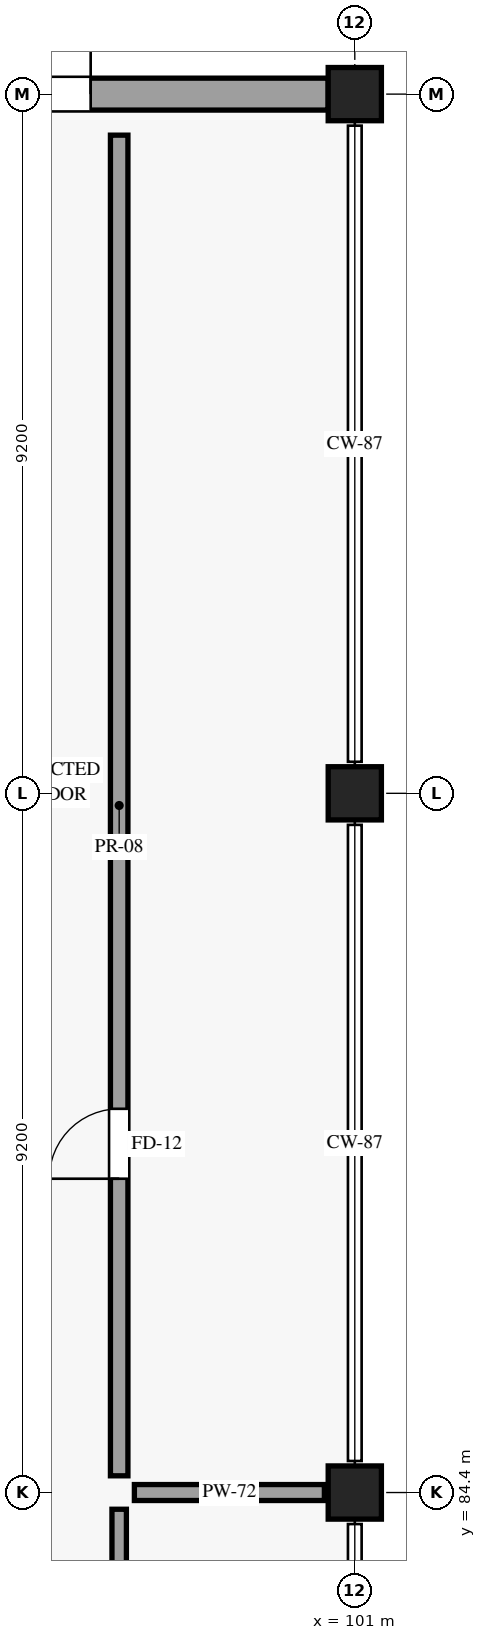
"""IFC4 building model, lengths in metres.
Left out: names, types, materials, properties, quantities, classifications, styles, units other than length and angle.
Written with IfcOpenShell. Run it as: python <this file> out.ifc"""

import sys

from ifc_helpers import new_model, si_unit, direction, frame, frame_2d, origin, origin_2d, place, context, subcontext, project, spatial, rectangle, extrude, element, fill, save


model = new_model("IFC4")
c1 = context("Model", 3, precision=1e-05, world=origin(), true_north=direction((0.0, 1.0)))
c2 = subcontext(c1, "Body", "Model", "MODEL_VIEW")
j1 = project(units=[si_unit("LENGTHUNIT", "METRE"), si_unit("PLANEANGLEUNIT", "RADIAN")], contexts=[c1])
p1 = place(None, origin())
s1 = spatial("IfcSite", under=j1, at=p1, CompositionType="ELEMENT")
p2 = place(p1, origin())
s2 = spatial("IfcBuilding", under=s1, at=p2, CompositionType="ELEMENT")
p3 = place(p2, origin())
s3 = spatial("IfcBuildingStorey", under=s2, at=p3, CompositionType="ELEMENT", Elevation=0.0)
for number, where, z_axis, x_axis in (
    (1, (101.0, 84.4, 0.0), (0.0, 0.0, 1.0), (1.0, 0.0, 0.0)),
    (2, (101.0, 93.6, 0.0), (0.0, 0.0, 1.0), (1.0, 0.0, 0.0)),
    (3, (101.0, 102.8, 0.0), (0.0, 0.0, 1.0), (1.0, 0.0, 0.0)),
):
    element("IfcColumn", number, at=place(p3, frame(where, z_axis=z_axis, x_axis=x_axis)), inside=s3, PredefinedType="COLUMN", context=c2, shape_type="SweptSolid", body=[
        extrude(rectangle(XDim=0.7, YDim=0.7, at=origin_2d()), origin(), (0.0, 0.0, 1.0), 5.4),
    ])
p4 = place(p3, frame((92.35, 102.8, 0.0), z_axis=(0.0, 0.0, 1.0), x_axis=(1.0, 0.0, 0.0)))
e4 = element("IfcWall", 4, at=p4, inside=s3, PredefinedType="STANDARD", context=c2, shape_type="SweptSolid", body=[
    extrude(rectangle(XDim=8.3, YDim=0.42, at=frame_2d((4.15, 0.0))), origin(), (0.0, 0.0, 1.0), 4.195),
])
p5 = place(p4, frame((3.125, 0.0, 0.0)))
e5 = element("IfcOpeningElement", 5, at=p5, cuts=e4, PredefinedType="OPENING", context=c2, shape_type="SweptSolid", body=[
    extrude(rectangle(XDim=2.05, YDim=2.45, at=frame_2d((1.025, 1.225))), frame((0.0, 0.22, 0.0), z_axis=(0.0, -1.0, 0.0), x_axis=(1.0, 0.0, 0.0)), (0.0, 0.0, 1.0), 0.44),
])
p6 = place(p3, frame((97.9, 75.42, 0.0), z_axis=(0.0, 0.0, 1.0), x_axis=(0.0, 1.0, 0.0)))
e6 = element("IfcWall", 6, at=p6, inside=s3, PredefinedType="PARTITIONING", context=c2, shape_type="SweptSolid", body=[
    extrude(rectangle(XDim=8.76, YDim=0.19, at=frame_2d((4.38, 0.0))), origin(), (0.0, 0.0, 1.0), 4.195),
])
p7 = place(p6, frame((3.88, 0.0, 0.0)))
e7 = element("IfcOpeningElement", 7, at=p7, cuts=e6, PredefinedType="OPENING", context=c2, shape_type="SweptSolid", body=[
    extrude(rectangle(XDim=1.2, YDim=2.3, at=frame_2d((0.6, 1.15))), frame((0.0, 0.105, 0.0), z_axis=(0.0, -1.0, 0.0), x_axis=(1.0, 0.0, 0.0)), (0.0, 0.0, 1.0), 0.21),
])
p8 = place(p3, frame((98.1, 84.4, 0.0), z_axis=(0.0, 0.0, 1.0), x_axis=(1.0, 0.0, 0.0)))
e8 = element("IfcWall", 8, at=p8, inside=s3, PredefinedType="PARTITIONING", context=c2, shape_type="SweptSolid", body=[
    extrude(rectangle(XDim=2.5, YDim=0.21, at=frame_2d((1.25, 0.0))), origin(), (0.0, 0.0, 1.0), 4.195),
])
p9 = place(p3, frame((97.9, 84.62, 0.0), z_axis=(0.0, 0.0, 1.0), x_axis=(0.0, 1.0, 0.0)))
e9 = element("IfcWall", 9, at=p9, inside=s3, PredefinedType="PARTITIONING", context=c2, shape_type="SweptSolid", body=[
    extrude(rectangle(XDim=17.64, YDim=0.23, at=frame_2d((8.82, 0.0))), origin(), (0.0, 0.0, 1.0), 4.195),
])
p10 = place(p9, frame((3.909, 0.0, 0.0)))
e10 = element("IfcOpeningElement", 10, at=p10, cuts=e9, PredefinedType="OPENING", context=c2, shape_type="SweptSolid", body=[
    extrude(rectangle(XDim=0.92, YDim=2.12, at=frame_2d((0.46, 1.06))), frame((0.0, 0.125, 0.0), z_axis=(0.0, -1.0, 0.0), x_axis=(1.0, 0.0, 0.0)), (0.0, 0.0, 1.0), 0.25),
])
p11 = place(p5, origin())
e11 = element("IfcDoor", 11, at=p11, inside=s3, OperationType="DOUBLE_DOOR_SINGLE_SWING", PredefinedType="DOOR", context=c2, shape_type="SweptSolid", body=[
    extrude(rectangle(XDim=2.05, YDim=2.45, at=frame_2d((1.025, 1.225))), frame((0.0, 0.025, 0.0), z_axis=(0.0, -1.0, 0.0), x_axis=(1.0, 0.0, 0.0)), (0.0, 0.0, 1.0), 0.05),
])
fill(e5, e11)
p12 = place(p10, origin())
e12 = element("IfcDoor", 12, at=p12, inside=s3, OperationType="SINGLE_SWING_LEFT", PredefinedType="DOOR", context=c2, shape_type="SweptSolid", body=[
    extrude(rectangle(XDim=0.92, YDim=2.12, at=frame_2d((0.46, 1.06))), frame((0.0, 0.025, 0.0), z_axis=(0.0, -1.0, 0.0), x_axis=(1.0, 0.0, 0.0)), (0.0, 0.0, 1.0), 0.05),
])
fill(e10, e12)
save(model, sys.argv[1])
